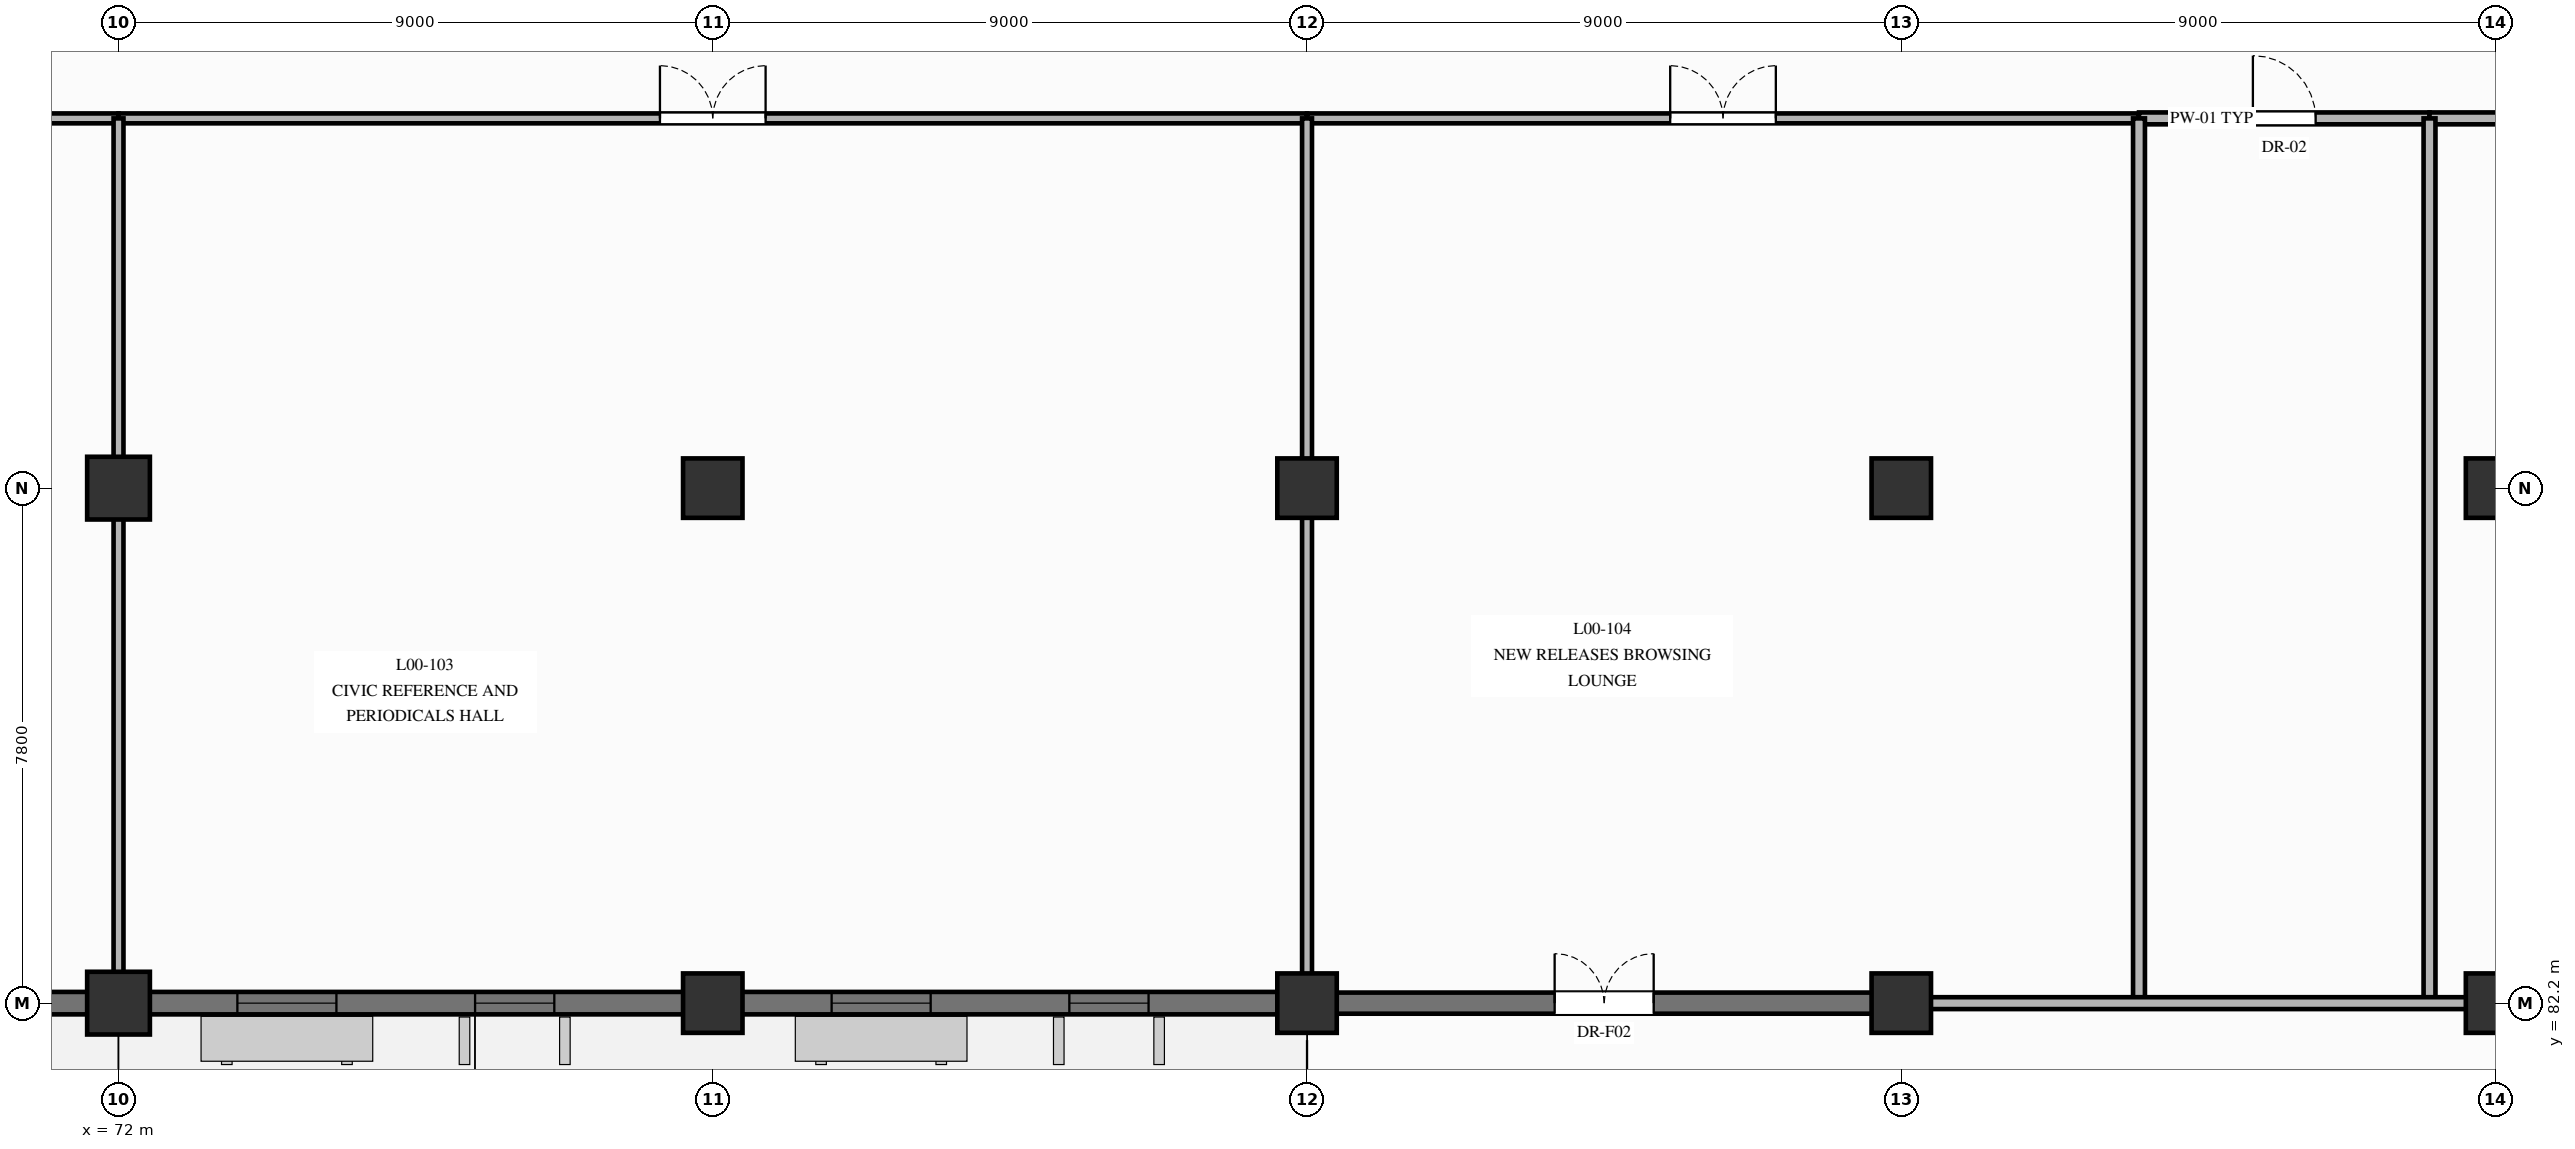
"""IFC4 building model, lengths in metres.
Left out: names, types, materials, properties, quantities, classifications, styles, units other than length and angle.
Written with IfcOpenShell. Run it as: python <this file> out.ifc"""

import sys

from ifc_helpers import new_model, si_unit, direction, frame, frame_2d, origin, origin_2d, place, context, subcontext, project, spatial, rectangle, extrude, element, fill, save


model = new_model("IFC4")
c1 = context("Model", 3, precision=1e-05, world=origin(), true_north=direction((0.0, 1.0)))
c2 = subcontext(c1, "Body", "Model", "MODEL_VIEW")
j1 = project(units=[si_unit("LENGTHUNIT", "METRE"), si_unit("PLANEANGLEUNIT", "RADIAN")], contexts=[c1])
p1 = place(None, origin())
s1 = spatial("IfcSite", under=j1, at=p1, CompositionType="ELEMENT")
p2 = place(p1, origin())
s2 = spatial("IfcBuilding", under=s1, at=p2, CompositionType="ELEMENT")
p3 = place(p2, origin())
s3 = spatial("IfcBuildingStorey", under=s2, at=p3, CompositionType="ELEMENT", Elevation=0.0)
for number, where, z_axis, x_axis in (
    (1, (72.0, 82.2, 0.0), (0.0, 0.0, 1.0), (1.0, 0.0, 0.0)),
    (2, (72.0, 90.0, 0.0), (0.0, 0.0, 1.0), (1.0, 0.0, 0.0)),
):
    element("IfcColumn", number, at=place(p3, frame(where, z_axis=z_axis, x_axis=x_axis)), inside=s3, PredefinedType="COLUMN", context=c2, shape_type="SweptSolid", body=[
        extrude(rectangle(XDim=0.95, YDim=0.95, at=origin_2d()), origin(), (0.0, 0.0, 1.0), 5.1),
    ])
for number, where, z_axis, x_axis in (
    (3, (81.0, 82.2, 0.0), (0.0, 0.0, 1.0), (1.0, 0.0, 0.0)),
    (4, (81.0, 90.0, 0.0), (0.0, 0.0, 1.0), (1.0, 0.0, 0.0)),
    (5, (90.0, 82.2, 0.0), (0.0, 0.0, 1.0), (1.0, 0.0, 0.0)),
    (6, (90.0, 90.0, 0.0), (0.0, 0.0, 1.0), (1.0, 0.0, 0.0)),
    (7, (99.0, 82.2, 0.0), (0.0, 0.0, 1.0), (1.0, 0.0, 0.0)),
    (8, (99.0, 90.0, 0.0), (0.0, 0.0, 1.0), (1.0, 0.0, 0.0)),
    (9, (108.0, 82.2, 0.0), (0.0, 0.0, 1.0), (1.0, 0.0, 0.0)),
    (10, (108.0, 90.0, 0.0), (0.0, 0.0, 1.0), (1.0, 0.0, 0.0)),
):
    element("IfcColumn", number, at=place(p3, frame(where, z_axis=z_axis, x_axis=x_axis)), inside=s3, PredefinedType="COLUMN", context=c2, shape_type="SweptSolid", body=[
        extrude(rectangle(XDim=0.9, YDim=0.9, at=origin_2d()), origin(), (0.0, 0.0, 1.0), 5.1),
    ])
p4 = place(p3, frame((63.0, 82.2, 0.0), z_axis=(0.0, 0.0, 1.0), x_axis=(1.0, 0.0, 0.0)))
e11 = element("IfcWall", 11, at=p4, inside=s3, PredefinedType="SOLIDWALL", context=c2, shape_type="SweptSolid", body=[
    extrude(rectangle(XDim=9.0, YDim=0.34, at=frame_2d((4.5, 0.0))), origin(), (0.0, 0.0, 1.0), 4.8),
])
p5 = place(p4, frame((1.8, 0.0, 0.85)))
e12 = element("IfcOpeningElement", 12, at=p5, cuts=e11, PredefinedType="OPENING", context=c2, shape_type="SweptSolid", body=[
    extrude(rectangle(XDim=1.5, YDim=2.1, at=frame_2d((0.75, 1.05))), frame((0.0, 0.18, 0.0), z_axis=(0.0, -1.0, 0.0), x_axis=(1.0, 0.0, 0.0)), (0.0, 0.0, 1.0), 0.36),
])
p6 = place(p4, frame((5.4, 0.0, 0.85)))
e13 = element("IfcOpeningElement", 13, at=p6, cuts=e11, PredefinedType="OPENING", context=c2, shape_type="SweptSolid", body=[
    extrude(rectangle(XDim=1.2, YDim=2.1, at=frame_2d((0.6, 1.05))), frame((0.0, 0.18, 0.0), z_axis=(0.0, -1.0, 0.0), x_axis=(1.0, 0.0, 0.0)), (0.0, 0.0, 1.0), 0.36),
])
p7 = place(p3, frame((72.0, 82.2, 0.0), z_axis=(0.0, 0.0, 1.0), x_axis=(1.0, 0.0, 0.0)))
e14 = element("IfcWall", 14, at=p7, inside=s3, PredefinedType="SOLIDWALL", context=c2, shape_type="SweptSolid", body=[
    extrude(rectangle(XDim=9.0, YDim=0.34, at=frame_2d((4.5, 0.0))), origin(), (0.0, 0.0, 1.0), 4.8),
])
p8 = place(p7, frame((1.8, 0.0, 0.85)))
e15 = element("IfcOpeningElement", 15, at=p8, cuts=e14, PredefinedType="OPENING", context=c2, shape_type="SweptSolid", body=[
    extrude(rectangle(XDim=1.5, YDim=2.1, at=frame_2d((0.75, 1.05))), frame((0.0, 0.18, 0.0), z_axis=(0.0, -1.0, 0.0), x_axis=(1.0, 0.0, 0.0)), (0.0, 0.0, 1.0), 0.36),
])
p9 = place(p7, frame((5.4, 0.0, 0.85)))
e16 = element("IfcOpeningElement", 16, at=p9, cuts=e14, PredefinedType="OPENING", context=c2, shape_type="SweptSolid", body=[
    extrude(rectangle(XDim=1.2, YDim=2.1, at=frame_2d((0.6, 1.05))), frame((0.0, 0.18, 0.0), z_axis=(0.0, -1.0, 0.0), x_axis=(1.0, 0.0, 0.0)), (0.0, 0.0, 1.0), 0.36),
])
p10 = place(p3, frame((81.0, 82.2, 0.0), z_axis=(0.0, 0.0, 1.0), x_axis=(1.0, 0.0, 0.0)))
e17 = element("IfcWall", 17, at=p10, inside=s3, PredefinedType="SOLIDWALL", context=c2, shape_type="SweptSolid", body=[
    extrude(rectangle(XDim=9.0, YDim=0.34, at=frame_2d((4.5, 0.0))), origin(), (0.0, 0.0, 1.0), 4.8),
])
p11 = place(p10, frame((1.8, 0.0, 0.85)))
e18 = element("IfcOpeningElement", 18, at=p11, cuts=e17, PredefinedType="OPENING", context=c2, shape_type="SweptSolid", body=[
    extrude(rectangle(XDim=1.5, YDim=2.1, at=frame_2d((0.75, 1.05))), frame((0.0, 0.18, 0.0), z_axis=(0.0, -1.0, 0.0), x_axis=(1.0, 0.0, 0.0)), (0.0, 0.0, 1.0), 0.36),
])
p12 = place(p10, frame((5.4, 0.0, 0.85)))
e19 = element("IfcOpeningElement", 19, at=p12, cuts=e17, PredefinedType="OPENING", context=c2, shape_type="SweptSolid", body=[
    extrude(rectangle(XDim=1.2, YDim=2.1, at=frame_2d((0.6, 1.05))), frame((0.0, 0.18, 0.0), z_axis=(0.0, -1.0, 0.0), x_axis=(1.0, 0.0, 0.0)), (0.0, 0.0, 1.0), 0.36),
])
p13 = place(p3, frame((90.0, 82.2, 0.0), z_axis=(0.0, 0.0, 1.0), x_axis=(1.0, 0.0, 0.0)))
e20 = element("IfcWall", 20, at=p13, inside=s3, PredefinedType="SHEAR", context=c2, shape_type="SweptSolid", body=[
    extrude(rectangle(XDim=9.0, YDim=0.32, at=frame_2d((4.5, 0.0))), origin(), (0.0, 0.0, 1.0), 4.8),
])
p14 = place(p13, frame((3.75, 0.0, 0.0)))
e21 = element("IfcOpeningElement", 21, at=p14, cuts=e20, PredefinedType="OPENING", context=c2, shape_type="SweptSolid", body=[
    extrude(rectangle(XDim=1.5, YDim=2.2, at=frame_2d((0.75, 1.1))), frame((0.0, 0.17, 0.0), z_axis=(0.0, -1.0, 0.0), x_axis=(1.0, 0.0, 0.0)), (0.0, 0.0, 1.0), 0.34),
])
p15 = place(p3, frame((54.0, 95.6, 0.0), z_axis=(0.0, 0.0, 1.0), x_axis=(1.0, 0.0, 0.0)))
e22 = element("IfcWall", 22, at=p15, inside=s3, PredefinedType="PARTITIONING", context=c2, shape_type="SweptSolid", body=[
    extrude(rectangle(XDim=18.0, YDim=0.15, at=frame_2d((9.0, 0.0))), origin(), (0.0, 0.0, 1.0), 3.995),
])
p16 = place(p15, frame((8.2, 0.0, 0.0)))
e23 = element("IfcOpeningElement", 23, at=p16, cuts=e22, PredefinedType="OPENING", context=c2, shape_type="SweptSolid", body=[
    extrude(rectangle(XDim=1.6, YDim=2.2, at=frame_2d((0.8, 1.1))), frame((0.0, 0.085, 0.0), z_axis=(0.0, -1.0, 0.0), x_axis=(1.0, 0.0, 0.0)), (0.0, 0.0, 1.0), 0.17),
])
p17 = place(p3, frame((72.0, 95.6, 0.0), z_axis=(0.0, 0.0, 1.0), x_axis=(1.0, 0.0, 0.0)))
e24 = element("IfcWall", 24, at=p17, inside=s3, PredefinedType="PARTITIONING", context=c2, shape_type="SweptSolid", body=[
    extrude(rectangle(XDim=18.0, YDim=0.15, at=frame_2d((9.0, 0.0))), origin(), (0.0, 0.0, 1.0), 3.995),
])
p18 = place(p17, frame((8.2, 0.0, 0.0)))
e25 = element("IfcOpeningElement", 25, at=p18, cuts=e24, PredefinedType="OPENING", context=c2, shape_type="SweptSolid", body=[
    extrude(rectangle(XDim=1.6, YDim=2.2, at=frame_2d((0.8, 1.1))), frame((0.0, 0.085, 0.0), z_axis=(0.0, -1.0, 0.0), x_axis=(1.0, 0.0, 0.0)), (0.0, 0.0, 1.0), 0.17),
])
p19 = place(p3, frame((72.0, 82.2, 0.0), z_axis=(0.0, 0.0, 1.0), x_axis=(0.0, 1.0, 0.0)))
e26 = element("IfcWall", 26, at=p19, inside=s3, PredefinedType="PARTITIONING", context=c2, shape_type="SweptSolid", body=[
    extrude(rectangle(XDim=13.4, YDim=0.15, at=frame_2d((6.7, 0.0))), origin(), (0.0, 0.0, 1.0), 4.095),
])
p20 = place(p3, frame((90.0, 95.6, 0.0), z_axis=(0.0, 0.0, 1.0), x_axis=(1.0, 0.0, 0.0)))
e27 = element("IfcWall", 27, at=p20, inside=s3, PredefinedType="PARTITIONING", context=c2, shape_type="SweptSolid", body=[
    extrude(rectangle(XDim=12.6, YDim=0.15, at=frame_2d((6.3, 0.0))), origin(), (0.0, 0.0, 1.0), 4.8),
])
p21 = place(p20, frame((5.5, 0.0, 0.0)))
e28 = element("IfcOpeningElement", 28, at=p21, cuts=e27, PredefinedType="OPENING", context=c2, shape_type="SweptSolid", body=[
    extrude(rectangle(XDim=1.6, YDim=2.2, at=frame_2d((0.8, 1.1))), frame((0.0, 0.085, 0.0), z_axis=(0.0, -1.0, 0.0), x_axis=(1.0, 0.0, 0.0)), (0.0, 0.0, 1.0), 0.17),
])
p22 = place(p3, frame((90.0, 82.2, 0.0), z_axis=(0.0, 0.0, 1.0), x_axis=(0.0, 1.0, 0.0)))
e29 = element("IfcWall", 29, at=p22, inside=s3, PredefinedType="PARTITIONING", context=c2, shape_type="SweptSolid", body=[
    extrude(rectangle(XDim=13.4, YDim=0.15, at=frame_2d((6.7, 0.0))), origin(), (0.0, 0.0, 1.0), 4.095),
])
p23 = place(p3, frame((102.6, 95.6, 0.0), z_axis=(0.0, 0.0, 1.0), x_axis=(1.0, 0.0, 0.0)))
e30 = element("IfcWall", 30, at=p23, inside=s3, PredefinedType="PLUMBINGWALL", context=c2, shape_type="SweptSolid", body=[
    extrude(rectangle(XDim=4.4, YDim=0.18, at=frame_2d((2.2, 0.0))), origin(), (0.0, 0.0, 1.0), 4.8),
])
p24 = place(p23, frame((1.725, 0.0, 0.0)))
e31 = element("IfcOpeningElement", 31, at=p24, cuts=e30, PredefinedType="OPENING", context=c2, shape_type="SweptSolid", body=[
    extrude(rectangle(XDim=0.95, YDim=2.15, at=frame_2d((0.475, 1.075))), frame((0.0, 0.1, 0.0), z_axis=(0.0, -1.0, 0.0), x_axis=(1.0, 0.0, 0.0)), (0.0, 0.0, 1.0), 0.2),
])
p25 = place(p3, frame((102.6, 82.2, 0.0), z_axis=(0.0, 0.0, 1.0), x_axis=(0.0, 1.0, 0.0)))
e32 = element("IfcWall", 32, at=p25, inside=s3, PredefinedType="PLUMBINGWALL", context=c2, shape_type="SweptSolid", body=[
    extrude(rectangle(XDim=13.4, YDim=0.18, at=frame_2d((6.7, 0.0))), origin(), (0.0, 0.0, 1.0), 4.8),
])
p26 = place(p3, frame((107.0, 95.6, 0.0), z_axis=(0.0, 0.0, 1.0), x_axis=(1.0, 0.0, 0.0)))
e33 = element("IfcWall", 33, at=p26, inside=s3, PredefinedType="PLUMBINGWALL", context=c2, shape_type="SweptSolid", body=[
    extrude(rectangle(XDim=4.4, YDim=0.18, at=frame_2d((2.2, 0.0))), origin(), (0.0, 0.0, 1.0), 4.8),
])
p27 = place(p26, frame((1.725, 0.0, 0.0)))
e34 = element("IfcOpeningElement", 34, at=p27, cuts=e33, PredefinedType="OPENING", context=c2, shape_type="SweptSolid", body=[
    extrude(rectangle(XDim=0.95, YDim=2.15, at=frame_2d((0.475, 1.075))), frame((0.0, 0.1, 0.0), z_axis=(0.0, -1.0, 0.0), x_axis=(1.0, 0.0, 0.0)), (0.0, 0.0, 1.0), 0.2),
])
p28 = place(p3, frame((107.0, 82.2, 0.0), z_axis=(0.0, 0.0, 1.0), x_axis=(0.0, 1.0, 0.0)))
e35 = element("IfcWall", 35, at=p28, inside=s3, PredefinedType="PLUMBINGWALL", context=c2, shape_type="SweptSolid", body=[
    extrude(rectangle(XDim=13.4, YDim=0.18, at=frame_2d((6.7, 0.0))), origin(), (0.0, 0.0, 1.0), 4.8),
])
p29 = place(p3, frame((99.0, 82.2, 0.0), z_axis=(0.0, 0.0, 1.0), x_axis=(1.0, 0.0, 0.0)))
e36 = element("IfcWall", 36, at=p29, inside=s3, PredefinedType="PLUMBINGWALL", context=c2, shape_type="SweptSolid", body=[
    extrude(rectangle(XDim=16.6, YDim=0.18, at=frame_2d((8.3, 0.0))), origin(), (0.0, 0.0, 1.0), 4.153),
])
p30 = place(p8, origin())
e37 = element("IfcWindow", 37, at=p30, inside=s3, PartitioningType="SINGLE_PANEL", PredefinedType="WINDOW", context=c2, shape_type="SweptSolid", body=[
    extrude(rectangle(XDim=1.5, YDim=2.1, at=frame_2d((0.75, 1.05))), frame((0.0, 0.03, 0.0), z_axis=(0.0, -1.0, 0.0), x_axis=(1.0, 0.0, 0.0)), (0.0, 0.0, 1.0), 0.06),
])
fill(e15, e37)
p31 = place(p9, origin())
e38 = element("IfcWindow", 38, at=p31, inside=s3, PartitioningType="SINGLE_PANEL", PredefinedType="WINDOW", context=c2, shape_type="SweptSolid", body=[
    extrude(rectangle(XDim=1.2, YDim=2.1, at=frame_2d((0.6, 1.05))), frame((0.0, 0.03, 0.0), z_axis=(0.0, -1.0, 0.0), x_axis=(1.0, 0.0, 0.0)), (0.0, 0.0, 1.0), 0.06),
])
fill(e16, e38)
p32 = place(p11, origin())
e39 = element("IfcWindow", 39, at=p32, inside=s3, PartitioningType="SINGLE_PANEL", PredefinedType="WINDOW", context=c2, shape_type="SweptSolid", body=[
    extrude(rectangle(XDim=1.5, YDim=2.1, at=frame_2d((0.75, 1.05))), frame((0.0, 0.03, 0.0), z_axis=(0.0, -1.0, 0.0), x_axis=(1.0, 0.0, 0.0)), (0.0, 0.0, 1.0), 0.06),
])
fill(e18, e39)
p33 = place(p12, origin())
e40 = element("IfcWindow", 40, at=p33, inside=s3, PartitioningType="SINGLE_PANEL", PredefinedType="WINDOW", context=c2, shape_type="SweptSolid", body=[
    extrude(rectangle(XDim=1.2, YDim=2.1, at=frame_2d((0.6, 1.05))), frame((0.0, 0.03, 0.0), z_axis=(0.0, -1.0, 0.0), x_axis=(1.0, 0.0, 0.0)), (0.0, 0.0, 1.0), 0.06),
])
fill(e19, e40)
p34 = place(p14, origin())
e41 = element("IfcDoor", 41, at=p34, inside=s3, OperationType="DOUBLE_DOOR_SINGLE_SWING", PredefinedType="DOOR", context=c2, shape_type="SweptSolid", body=[
    extrude(rectangle(XDim=1.5, YDim=2.2, at=frame_2d((0.75, 1.1))), frame((0.0, 0.025, 0.0), z_axis=(0.0, -1.0, 0.0), x_axis=(1.0, 0.0, 0.0)), (0.0, 0.0, 1.0), 0.05),
])
fill(e21, e41)
p35 = place(p18, origin())
e42 = element("IfcDoor", 42, at=p35, inside=s3, OperationType="DOUBLE_DOOR_SINGLE_SWING", PredefinedType="DOOR", context=c2, shape_type="SweptSolid", body=[
    extrude(rectangle(XDim=1.6, YDim=2.2, at=frame_2d((0.8, 1.1))), frame((0.0, 0.025, 0.0), z_axis=(0.0, -1.0, 0.0), x_axis=(1.0, 0.0, 0.0)), (0.0, 0.0, 1.0), 0.05),
])
fill(e25, e42)
p36 = place(p21, origin())
e43 = element("IfcDoor", 43, at=p36, inside=s3, OperationType="DOUBLE_DOOR_SINGLE_SWING", PredefinedType="DOOR", context=c2, shape_type="SweptSolid", body=[
    extrude(rectangle(XDim=1.6, YDim=2.2, at=frame_2d((0.8, 1.1))), frame((0.0, 0.025, 0.0), z_axis=(0.0, -1.0, 0.0), x_axis=(1.0, 0.0, 0.0)), (0.0, 0.0, 1.0), 0.05),
])
fill(e28, e43)
p37 = place(p24, origin())
e44 = element("IfcDoor", 44, at=p37, inside=s3, OperationType="SINGLE_SWING_LEFT", PredefinedType="DOOR", context=c2, shape_type="SweptSolid", body=[
    extrude(rectangle(XDim=0.95, YDim=2.15, at=frame_2d((0.475, 1.075))), frame((0.0, 0.025, 0.0), z_axis=(0.0, -1.0, 0.0), x_axis=(1.0, 0.0, 0.0)), (0.0, 0.0, 1.0), 0.05),
])
fill(e31, e44)
save(model, sys.argv[1])
